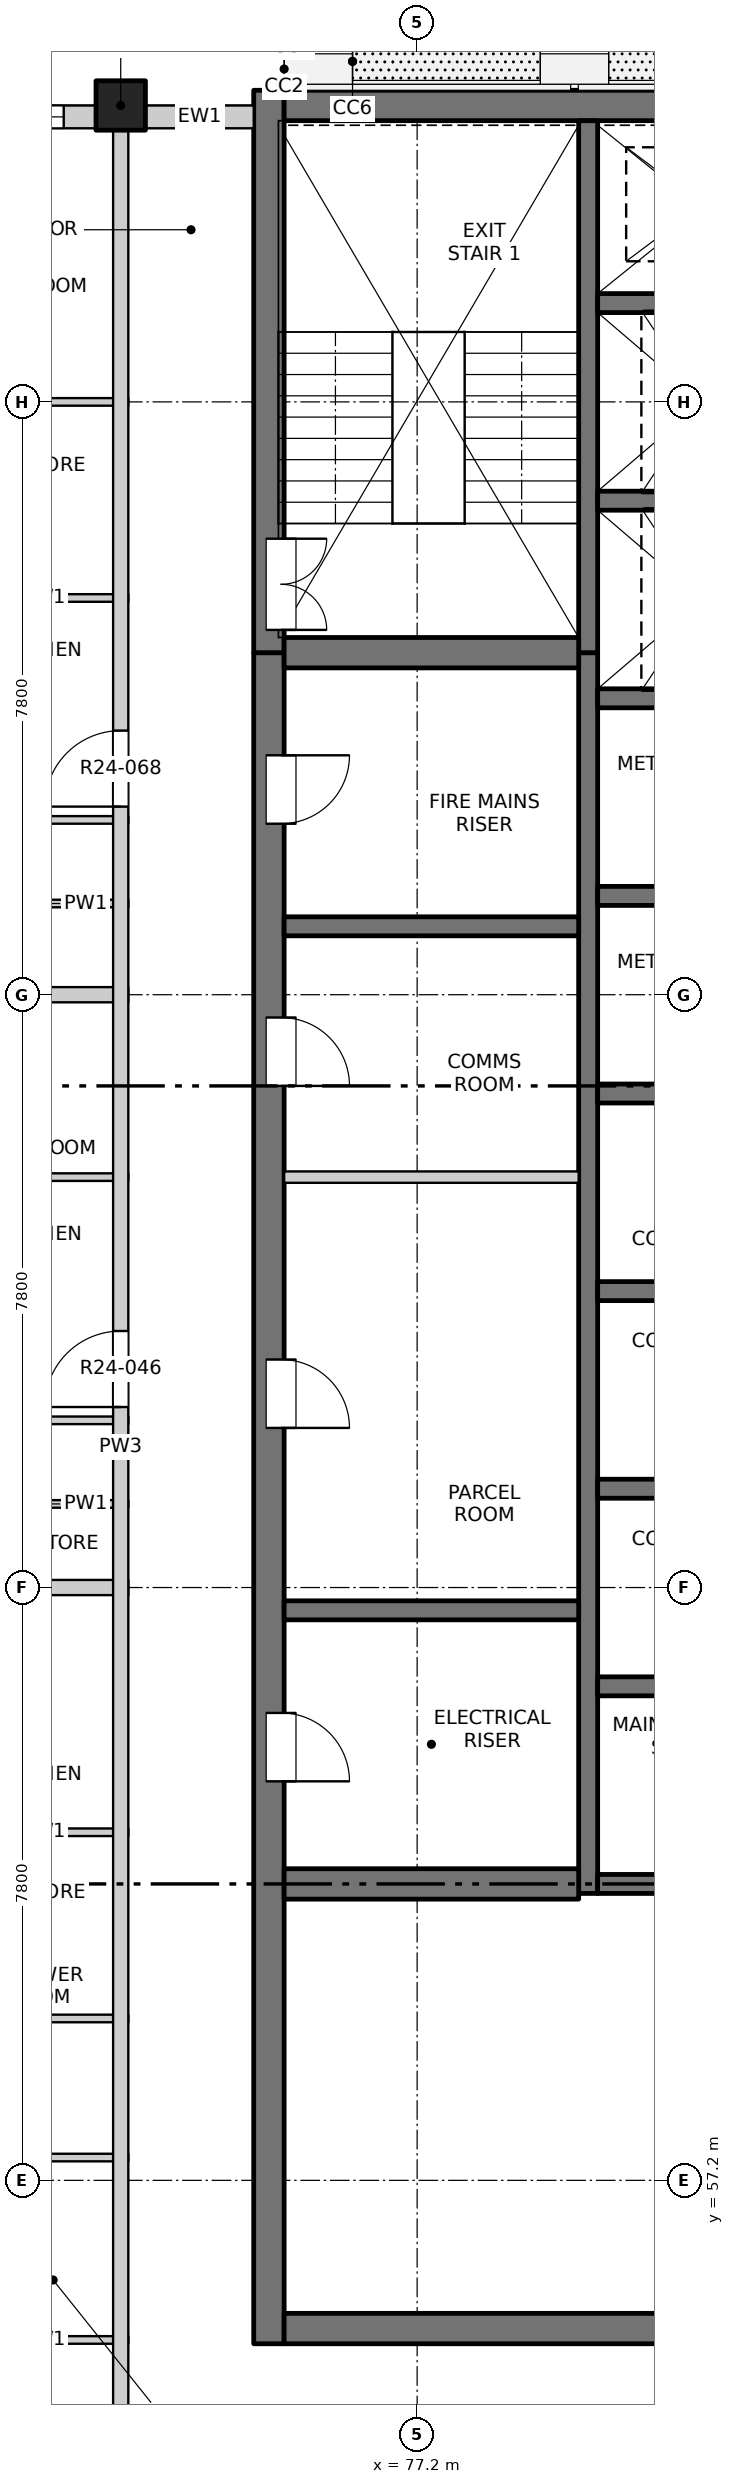
"""IFC4 building model, lengths in metres.
Left out: names, types, materials, properties, quantities, classifications, styles, units other than length and angle.
Written with IfcOpenShell. Run it as: python <this file> out.ifc"""

import sys

from ifc_helpers import new_model, si_unit, direction, frame, frame_2d, origin, origin_2d, place, context, subcontext, project, spatial, rectangle, extrude, element, fill, save


model = new_model("IFC4")
c1 = context("Model", 3, precision=1e-05, world=origin(), true_north=direction((0.0, 1.0)))
c2 = subcontext(c1, "Body", "Model", "MODEL_VIEW")
j1 = project(units=[si_unit("LENGTHUNIT", "METRE"), si_unit("PLANEANGLEUNIT", "RADIAN")], contexts=[c1])
p1 = place(None, origin())
s1 = spatial("IfcSite", under=j1, at=p1, CompositionType="ELEMENT")
p2 = place(p1, origin())
s2 = spatial("IfcBuilding", under=s1, at=p2, CompositionType="ELEMENT")
p3 = place(p2, frame((0.0, 0.0, 249.4)))
s3 = spatial("IfcBuildingStorey", under=s2, at=p3, CompositionType="ELEMENT", Elevation=249.4)
p4 = place(p3, frame((73.3, 84.5, -0.25), z_axis=(0.0, 0.0, 1.0), x_axis=(1.0, 0.0, 0.0)))
e1 = element("IfcColumn", 1, at=p4, inside=s3, PredefinedType="COLUMN", context=c2, shape_type="SweptSolid", body=[
    extrude(rectangle(XDim=0.65, YDim=0.65, at=origin_2d()), origin(), (0.0, 0.0, 1.0), 3.4),
])
p5 = place(p3, frame((75.25, 55.05, -0.25), z_axis=(0.0, 0.0, 1.0), x_axis=(0.0, 1.0, 0.0)))
e2 = element("IfcWall", 2, at=p5, inside=s3, PredefinedType="SOLIDWALL", context=c2, shape_type="SweptSolid", body=[
    extrude(rectangle(XDim=22.25, YDim=0.4, at=frame_2d((11.125, 0.0))), origin(), (0.0, 0.0, 1.0), 3.4),
])
p6 = place(p5, frame((7.4, 0.0, 0.25)))
e3 = element("IfcOpeningElement", 3, at=p6, cuts=e2, PredefinedType="OPENING", context=c2, shape_type="SweptSolid", body=[
    extrude(rectangle(XDim=0.9, YDim=2.1, at=frame_2d((0.45, 1.05))), frame((0.0, 0.21, 0.0), z_axis=(0.0, -1.0, 0.0), x_axis=(1.0, 0.0, 0.0)), (0.0, 0.0, 1.0), 0.42),
])
p7 = place(p5, frame((12.05, 0.0, 0.25)))
e4 = element("IfcOpeningElement", 4, at=p7, cuts=e2, PredefinedType="OPENING", context=c2, shape_type="SweptSolid", body=[
    extrude(rectangle(XDim=0.9, YDim=2.1, at=frame_2d((0.45, 1.05))), frame((0.0, 0.21, 0.0), z_axis=(0.0, -1.0, 0.0), x_axis=(1.0, 0.0, 0.0)), (0.0, 0.0, 1.0), 0.42),
])
p8 = place(p5, frame((16.55, 0.0, 0.25)))
e5 = element("IfcOpeningElement", 5, at=p8, cuts=e2, PredefinedType="OPENING", context=c2, shape_type="SweptSolid", body=[
    extrude(rectangle(XDim=0.9, YDim=2.1, at=frame_2d((0.45, 1.05))), frame((0.0, 0.21, 0.0), z_axis=(0.0, -1.0, 0.0), x_axis=(1.0, 0.0, 0.0)), (0.0, 0.0, 1.0), 0.42),
])
p9 = place(p5, frame((20.0, 0.0, 0.25)))
e6 = element("IfcOpeningElement", 6, at=p9, cuts=e2, PredefinedType="OPENING", context=c2, shape_type="SweptSolid", body=[
    extrude(rectangle(XDim=0.9, YDim=2.1, at=frame_2d((0.45, 1.05))), frame((0.0, 0.21, 0.0), z_axis=(0.0, -1.0, 0.0), x_axis=(1.0, 0.0, 0.0)), (0.0, 0.0, 1.0), 0.42),
])
p10 = place(p3, frame((75.25, 77.3, -0.25), z_axis=(0.0, 0.0, 1.0), x_axis=(0.0, 1.0, 0.0)))
e7 = element("IfcWall", 7, at=p10, inside=s3, PredefinedType="SOLIDWALL", context=c2, shape_type="SweptSolid", body=[
    extrude(rectangle(XDim=7.4, YDim=0.4, at=frame_2d((3.7, 0.0))), origin(), (0.0, 0.0, 1.0), 3.4),
])
p11 = place(p10, frame((0.3, 0.0, 0.25)))
e8 = element("IfcOpeningElement", 8, at=p11, cuts=e7, PredefinedType="OPENING", context=c2, shape_type="SweptSolid", body=[
    extrude(rectangle(XDim=1.2, YDim=2.1, at=frame_2d((0.6, 1.05))), frame((0.0, 0.21, 0.0), z_axis=(0.0, -1.0, 0.0), x_axis=(1.0, 0.0, 0.0)), (0.0, 0.0, 1.0), 0.42),
])
p12 = place(p3, frame((75.45, 55.25, -0.25), z_axis=(0.0, 0.0, 1.0), x_axis=(1.0, 0.0, 0.0)))
e9 = element("IfcWall", 9, at=p12, inside=s3, PredefinedType="SOLIDWALL", context=c2, shape_type="SweptSolid", body=[
    extrude(rectangle(XDim=19.1, YDim=0.4, at=frame_2d((9.55, 0.0))), origin(), (0.0, 0.0, 1.0), 3.4),
])
p13 = place(p12, frame((8.8, 0.0, 0.25)))
e10 = element("IfcOpeningElement", 10, at=p13, cuts=e9, PredefinedType="OPENING", context=c2, shape_type="SweptSolid", body=[
    extrude(rectangle(XDim=1.5, YDim=2.1, at=frame_2d((0.75, 1.05))), frame((0.0, 0.21, 0.0), z_axis=(0.0, -1.0, 0.0), x_axis=(1.0, 0.0, 0.0)), (0.0, 0.0, 1.0), 0.42),
])
p14 = place(p3, frame((75.45, 84.5, -0.25), z_axis=(0.0, 0.0, 1.0), x_axis=(1.0, 0.0, 0.0)))
e11 = element("IfcWall", 11, at=p14, inside=s3, PredefinedType="SOLIDWALL", context=c2, shape_type="SweptSolid", body=[
    extrude(rectangle(XDim=19.1, YDim=0.4, at=frame_2d((9.55, 0.0))), origin(), (0.0, 0.0, 1.0), 3.4),
])
p15 = place(p3, frame((79.45, 60.975, -0.25), z_axis=(0.0, 0.0, 1.0), x_axis=(0.0, 1.0, 0.0)))
e12 = element("IfcWall", 12, at=p15, inside=s3, PredefinedType="SOLIDWALL", context=c2, shape_type="SweptSolid", body=[
    extrude(rectangle(XDim=16.325, YDim=0.25, at=frame_2d((8.163, 0.0))), origin(), (0.0, 0.0, 1.0), 3.4),
])
p16 = place(p3, frame((79.45, 77.3, -0.25), z_axis=(0.0, 0.0, 1.0), x_axis=(0.0, 1.0, 0.0)))
e13 = element("IfcWall", 13, at=p16, inside=s3, PredefinedType="SOLIDWALL", context=c2, shape_type="SweptSolid", body=[
    extrude(rectangle(XDim=7.0, YDim=0.25, at=frame_2d((3.5, 0.0))), origin(), (0.0, 0.0, 1.0), 3.4),
])
for number, where, z_axis, x_axis in (
    (14, (79.575, 61.1, -0.25), (0.0, 0.0, 1.0), (1.0, 0.0, 0.0)),
    (15, (79.575, 63.7, -0.25), (0.0, 0.0, 1.0), (1.0, 0.0, 0.0)),
    (16, (79.575, 66.3, -0.25), (0.0, 0.0, 1.0), (1.0, 0.0, 0.0)),
    (17, (79.575, 68.9, -0.25), (0.0, 0.0, 1.0), (1.0, 0.0, 0.0)),
    (18, (79.575, 71.5, -0.25), (0.0, 0.0, 1.0), (1.0, 0.0, 0.0)),
    (19, (79.575, 74.1, -0.25), (0.0, 0.0, 1.0), (1.0, 0.0, 0.0)),
    (20, (79.575, 76.7, -0.25), (0.0, 0.0, 1.0), (1.0, 0.0, 0.0)),
    (21, (79.575, 79.3, -0.25), (0.0, 0.0, 1.0), (1.0, 0.0, 0.0)),
    (22, (79.575, 81.9, -0.25), (0.0, 0.0, 1.0), (1.0, 0.0, 0.0)),
):
    element("IfcWall", number, at=place(p3, frame(where, z_axis=z_axis, x_axis=x_axis)), inside=s3, PredefinedType="SOLIDWALL", context=c2, shape_type="SweptSolid", body=[
        extrude(rectangle(XDim=3.0, YDim=0.25, at=frame_2d((1.5, 0.0))), origin(), (0.0, 0.0, 1.0), 3.4),
    ])
p17 = place(p3, frame((75.45, 61.1, -0.25), z_axis=(0.0, 0.0, 1.0), x_axis=(1.0, 0.0, 0.0)))
e23 = element("IfcWall", 23, at=p17, inside=s3, PredefinedType="SOLIDWALL", context=c2, shape_type="SweptSolid", body=[
    extrude(rectangle(XDim=3.875, YDim=0.4, at=frame_2d((1.938, 0.0))), origin(), (0.0, 0.0, 1.0), 3.4),
])
for number, where, z_axis, x_axis in (
    (24, (75.45, 64.7, -0.25), (0.0, 0.0, 1.0), (1.0, 0.0, 0.0)),
    (25, (75.45, 73.7, -0.25), (0.0, 0.0, 1.0), (1.0, 0.0, 0.0)),
):
    element("IfcWall", number, at=place(p3, frame(where, z_axis=z_axis, x_axis=x_axis)), inside=s3, PredefinedType="SOLIDWALL", context=c2, shape_type="SweptSolid", body=[
        extrude(rectangle(XDim=3.875, YDim=0.25, at=frame_2d((1.938, 0.0))), origin(), (0.0, 0.0, 1.0), 3.4),
    ])
p18 = place(p3, frame((75.45, 77.3, -0.25), z_axis=(0.0, 0.0, 1.0), x_axis=(1.0, 0.0, 0.0)))
e26 = element("IfcWall", 26, at=p18, inside=s3, PredefinedType="SOLIDWALL", context=c2, shape_type="SweptSolid", body=[
    extrude(rectangle(XDim=3.875, YDim=0.4, at=frame_2d((1.938, 0.0))), origin(), (0.0, 0.0, 1.0), 3.4),
])
p19 = place(p3, frame((69.4, 84.35, 0.0), z_axis=(0.0, 0.0, 1.0), x_axis=(1.0, 0.0, 0.0)))
e27 = element("IfcWall", 27, at=p19, inside=s3, PredefinedType="SOLIDWALL", context=c2, shape_type="SweptSolid", body=[
    extrude(rectangle(XDim=3.575, YDim=0.3, at=frame_2d((1.788, 0.0))), origin(), (0.0, 0.0, 1.0), 2.7),
])
p20 = place(p19, frame((0.75, 0.0, 0.9)))
e28 = element("IfcOpeningElement", 28, at=p20, cuts=e27, PredefinedType="OPENING", context=c2, shape_type="SweptSolid", body=[
    extrude(rectangle(XDim=2.4, YDim=1.8, at=frame_2d((1.2, 0.9))), frame((0.0, 0.16, 0.0), z_axis=(0.0, -1.0, 0.0), x_axis=(1.0, 0.0, 0.0)), (0.0, 0.0, 1.0), 0.32),
])
p21 = place(p3, frame((73.625, 84.35, 0.0), z_axis=(0.0, 0.0, 1.0), x_axis=(1.0, 0.0, 0.0)))
e29 = element("IfcWall", 29, at=p21, inside=s3, PredefinedType="SOLIDWALL", context=c2, shape_type="SweptSolid", body=[
    extrude(rectangle(XDim=1.425, YDim=0.3, at=frame_2d((0.712, 0.0))), origin(), (0.0, 0.0, 1.0), 2.7),
])
for number, where, z_axis, x_axis in (
    (30, (71.18, 55.1, 0.0), (0.0, 0.0, 1.0), (1.0, 0.0, 0.0)),
    (31, (71.18, 57.5, 0.0), (0.0, 0.0, 1.0), (1.0, 0.0, 0.0)),
    (32, (71.18, 59.33, 0.0), (0.0, 0.0, 1.0), (1.0, 0.0, 0.0)),
    (33, (71.18, 61.78, 0.0), (0.0, 0.0, 1.0), (1.0, 0.0, 0.0)),
):
    element("IfcWall", number, at=place(p3, frame(where, z_axis=z_axis, x_axis=x_axis)), inside=s3, PredefinedType="PARTITIONING", context=c2, shape_type="SweptSolid", body=[
        extrude(rectangle(XDim=2.22, YDim=0.1, at=frame_2d((1.11, 0.0))), origin(), (0.0, 0.0, 1.0), 3.15),
    ])
p22 = place(p3, frame((65.8, 65.0, 0.0), z_axis=(0.0, 0.0, 1.0), x_axis=(1.0, 0.0, 0.0)))
e34 = element("IfcWall", 34, at=p22, inside=s3, PredefinedType="PARTITIONING", context=c2, shape_type="SweptSolid", body=[
    extrude(rectangle(XDim=7.6, YDim=0.2, at=frame_2d((3.8, 0.0))), origin(), (0.0, 0.0, 1.0), 3.15),
])
for number, where, z_axis, x_axis in (
    (35, (71.18, 66.1, 0.0), (0.0, 0.0, 1.0), (1.0, 0.0, 0.0)),
    (36, (71.18, 67.2, 0.0), (0.0, 0.0, 1.0), (1.0, 0.0, 0.0)),
    (37, (71.18, 70.4, 0.0), (0.0, 0.0, 1.0), (1.0, 0.0, 0.0)),
):
    element("IfcWall", number, at=place(p3, frame(where, z_axis=z_axis, x_axis=x_axis)), inside=s3, PredefinedType="PARTITIONING", context=c2, shape_type="SweptSolid", body=[
        extrude(rectangle(XDim=2.22, YDim=0.1, at=frame_2d((1.11, 0.0))), origin(), (0.0, 0.0, 1.0), 3.15),
    ])
p23 = place(p3, frame((75.45, 70.4, 0.0), z_axis=(0.0, 0.0, 1.0), x_axis=(1.0, 0.0, 0.0)))
e38 = element("IfcWall", 38, at=p23, inside=s3, PredefinedType="PARTITIONING", context=c2, shape_type="SweptSolid", body=[
    extrude(rectangle(XDim=3.875, YDim=0.15, at=frame_2d((1.938, 0.0))), origin(), (0.0, 0.0, 1.0), 3.15),
])
p24 = place(p3, frame((65.8, 72.8, 0.0), z_axis=(0.0, 0.0, 1.0), x_axis=(1.0, 0.0, 0.0)))
e39 = element("IfcWall", 39, at=p24, inside=s3, PredefinedType="PARTITIONING", context=c2, shape_type="SweptSolid", body=[
    extrude(rectangle(XDim=7.6, YDim=0.2, at=frame_2d((3.8, 0.0))), origin(), (0.0, 0.0, 1.0), 3.15),
])
for number, where, z_axis, x_axis in (
    (40, (71.18, 74.0, 0.0), (0.0, 0.0, 1.0), (1.0, 0.0, 0.0)),
    (41, (71.18, 75.1, 0.0), (0.0, 0.0, 1.0), (1.0, 0.0, 0.0)),
    (42, (71.18, 78.02, 0.0), (0.0, 0.0, 1.0), (1.0, 0.0, 0.0)),
):
    element("IfcWall", number, at=place(p3, frame(where, z_axis=z_axis, x_axis=x_axis)), inside=s3, PredefinedType="PARTITIONING", context=c2, shape_type="SweptSolid", body=[
        extrude(rectangle(XDim=2.22, YDim=0.1, at=frame_2d((1.11, 0.0))), origin(), (0.0, 0.0, 1.0), 3.15),
    ])
p25 = place(p3, frame((65.8, 80.6, 0.0), z_axis=(0.0, 0.0, 1.0), x_axis=(1.0, 0.0, 0.0)))
e43 = element("IfcWall", 43, at=p25, inside=s3, PredefinedType="PARTITIONING", context=c2, shape_type="SweptSolid", body=[
    extrude(rectangle(XDim=7.6, YDim=0.1, at=frame_2d((3.8, 0.0))), origin(), (0.0, 0.0, 1.0), 3.15),
])
p26 = place(p25, frame((4.09, 0.0, 0.0)))
e44 = element("IfcOpeningElement", 44, at=p26, cuts=e43, PredefinedType="OPENING", context=c2, shape_type="SweptSolid", body=[
    extrude(rectangle(XDim=0.9, YDim=2.1, at=frame_2d((0.45, 1.05))), frame((0.0, 0.06, 0.0), z_axis=(0.0, -1.0, 0.0), x_axis=(1.0, 0.0, 0.0)), (0.0, 0.0, 1.0), 0.12),
])
p27 = place(p3, frame((73.3, 49.5, 0.0), z_axis=(0.0, 0.0, 1.0), x_axis=(0.0, 1.0, 0.0)))
e45 = element("IfcWall", 45, at=p27, inside=s3, PredefinedType="PARTITIONING", context=c2, shape_type="SweptSolid", body=[
    extrude(rectangle(XDim=34.7, YDim=0.2, at=frame_2d((17.35, 0.0))), origin(), (0.0, 0.0, 1.0), 3.15),
])
p28 = place(p27, frame((3.325, 0.0, 0.0)))
e46 = element("IfcOpeningElement", 46, at=p28, cuts=e45, PredefinedType="OPENING", context=c2, shape_type="SweptSolid", body=[
    extrude(rectangle(XDim=1.0, YDim=2.1, at=frame_2d((0.5, 1.05))), frame((0.0, 0.11, 0.0), z_axis=(0.0, -1.0, 0.0), x_axis=(1.0, 0.0, 0.0)), (0.0, 0.0, 1.0), 0.22),
])
p29 = place(p27, frame((17.875, 0.0, 0.0)))
e47 = element("IfcOpeningElement", 47, at=p29, cuts=e45, PredefinedType="OPENING", context=c2, shape_type="SweptSolid", body=[
    extrude(rectangle(XDim=1.0, YDim=2.1, at=frame_2d((0.5, 1.05))), frame((0.0, 0.11, 0.0), z_axis=(0.0, -1.0, 0.0), x_axis=(1.0, 0.0, 0.0)), (0.0, 0.0, 1.0), 0.22),
])
p30 = place(p27, frame((25.775, 0.0, 0.0)))
e48 = element("IfcOpeningElement", 48, at=p30, cuts=e45, PredefinedType="OPENING", context=c2, shape_type="SweptSolid", body=[
    extrude(rectangle(XDim=1.0, YDim=2.1, at=frame_2d((0.5, 1.05))), frame((0.0, 0.11, 0.0), z_axis=(0.0, -1.0, 0.0), x_axis=(1.0, 0.0, 0.0)), (0.0, 0.0, 1.0), 0.22),
])
p31 = place(p20, origin())
e49 = element("IfcWindow", 49, at=p31, inside=s3, PartitioningType="DOUBLE_PANEL_VERTICAL", PredefinedType="WINDOW", context=c2, shape_type="SweptSolid", body=[
    extrude(rectangle(XDim=2.4, YDim=1.8, at=frame_2d((1.2, 0.9))), frame((0.0, 0.03, 0.0), z_axis=(0.0, -1.0, 0.0), x_axis=(1.0, 0.0, 0.0)), (0.0, 0.0, 1.0), 0.06),
])
fill(e28, e49)
p32 = place(p6, origin())
e50 = element("IfcDoor", 50, at=p32, inside=s3, OperationType="SINGLE_SWING_RIGHT", PredefinedType="DOOR", context=c2, shape_type="SweptSolid", body=[
    extrude(rectangle(XDim=0.9, YDim=2.1, at=frame_2d((0.45, 1.05))), frame((0.0, -0.135, 0.0), z_axis=(0.0, -1.0, 0.0), x_axis=(1.0, 0.0, 0.0)), (0.0, 0.0, 1.0), 0.05),
])
fill(e3, e50)
p33 = place(p7, origin())
e51 = element("IfcDoor", 51, at=p33, inside=s3, OperationType="SINGLE_SWING_RIGHT", PredefinedType="DOOR", context=c2, shape_type="SweptSolid", body=[
    extrude(rectangle(XDim=0.9, YDim=2.1, at=frame_2d((0.45, 1.05))), frame((0.0, -0.135, 0.0), z_axis=(0.0, -1.0, 0.0), x_axis=(1.0, 0.0, 0.0)), (0.0, 0.0, 1.0), 0.05),
])
fill(e4, e51)
p34 = place(p29, origin())
e52 = element("IfcDoor", 52, at=p34, inside=s3, OperationType="SINGLE_SWING_RIGHT", PredefinedType="DOOR", context=c2, shape_type="SweptSolid", body=[
    extrude(rectangle(XDim=1.0, YDim=2.1, at=frame_2d((0.5, 1.05))), frame((0.0, 0.025, 0.0), z_axis=(0.0, -1.0, 0.0), x_axis=(1.0, 0.0, 0.0)), (0.0, 0.0, 1.0), 0.05),
])
fill(e47, e52)
p35 = place(p8, origin())
e53 = element("IfcDoor", 53, at=p35, inside=s3, OperationType="SINGLE_SWING_RIGHT", PredefinedType="DOOR", context=c2, shape_type="SweptSolid", body=[
    extrude(rectangle(XDim=0.9, YDim=2.1, at=frame_2d((0.45, 1.05))), frame((0.0, -0.135, 0.0), z_axis=(0.0, -1.0, 0.0), x_axis=(1.0, 0.0, 0.0)), (0.0, 0.0, 1.0), 0.05),
])
fill(e5, e53)
p36 = place(p9, origin())
e54 = element("IfcDoor", 54, at=p36, inside=s3, OperationType="SINGLE_SWING_LEFT", PredefinedType="DOOR", context=c2, shape_type="SweptSolid", body=[
    extrude(rectangle(XDim=0.9, YDim=2.1, at=frame_2d((0.45, 1.05))), frame((0.0, -0.135, 0.0), z_axis=(0.0, -1.0, 0.0), x_axis=(1.0, 0.0, 0.0)), (0.0, 0.0, 1.0), 0.05),
])
fill(e6, e54)
p37 = place(p30, origin())
e55 = element("IfcDoor", 55, at=p37, inside=s3, OperationType="SINGLE_SWING_RIGHT", PredefinedType="DOOR", context=c2, shape_type="SweptSolid", body=[
    extrude(rectangle(XDim=1.0, YDim=2.1, at=frame_2d((0.5, 1.05))), frame((0.0, 0.025, 0.0), z_axis=(0.0, -1.0, 0.0), x_axis=(1.0, 0.0, 0.0)), (0.0, 0.0, 1.0), 0.05),
])
fill(e48, e55)
p38 = place(p11, origin())
e56 = element("IfcDoor", 56, at=p38, inside=s3, OperationType="DOUBLE_DOOR_SINGLE_SWING", PredefinedType="DOOR", context=c2, shape_type="SweptSolid", body=[
    extrude(rectangle(XDim=1.2, YDim=2.1, at=frame_2d((0.6, 1.05))), frame((0.0, -0.135, 0.0), z_axis=(0.0, -1.0, 0.0), x_axis=(1.0, 0.0, 0.0)), (0.0, 0.0, 1.0), 0.05),
])
fill(e8, e56)
save(model, sys.argv[1])
